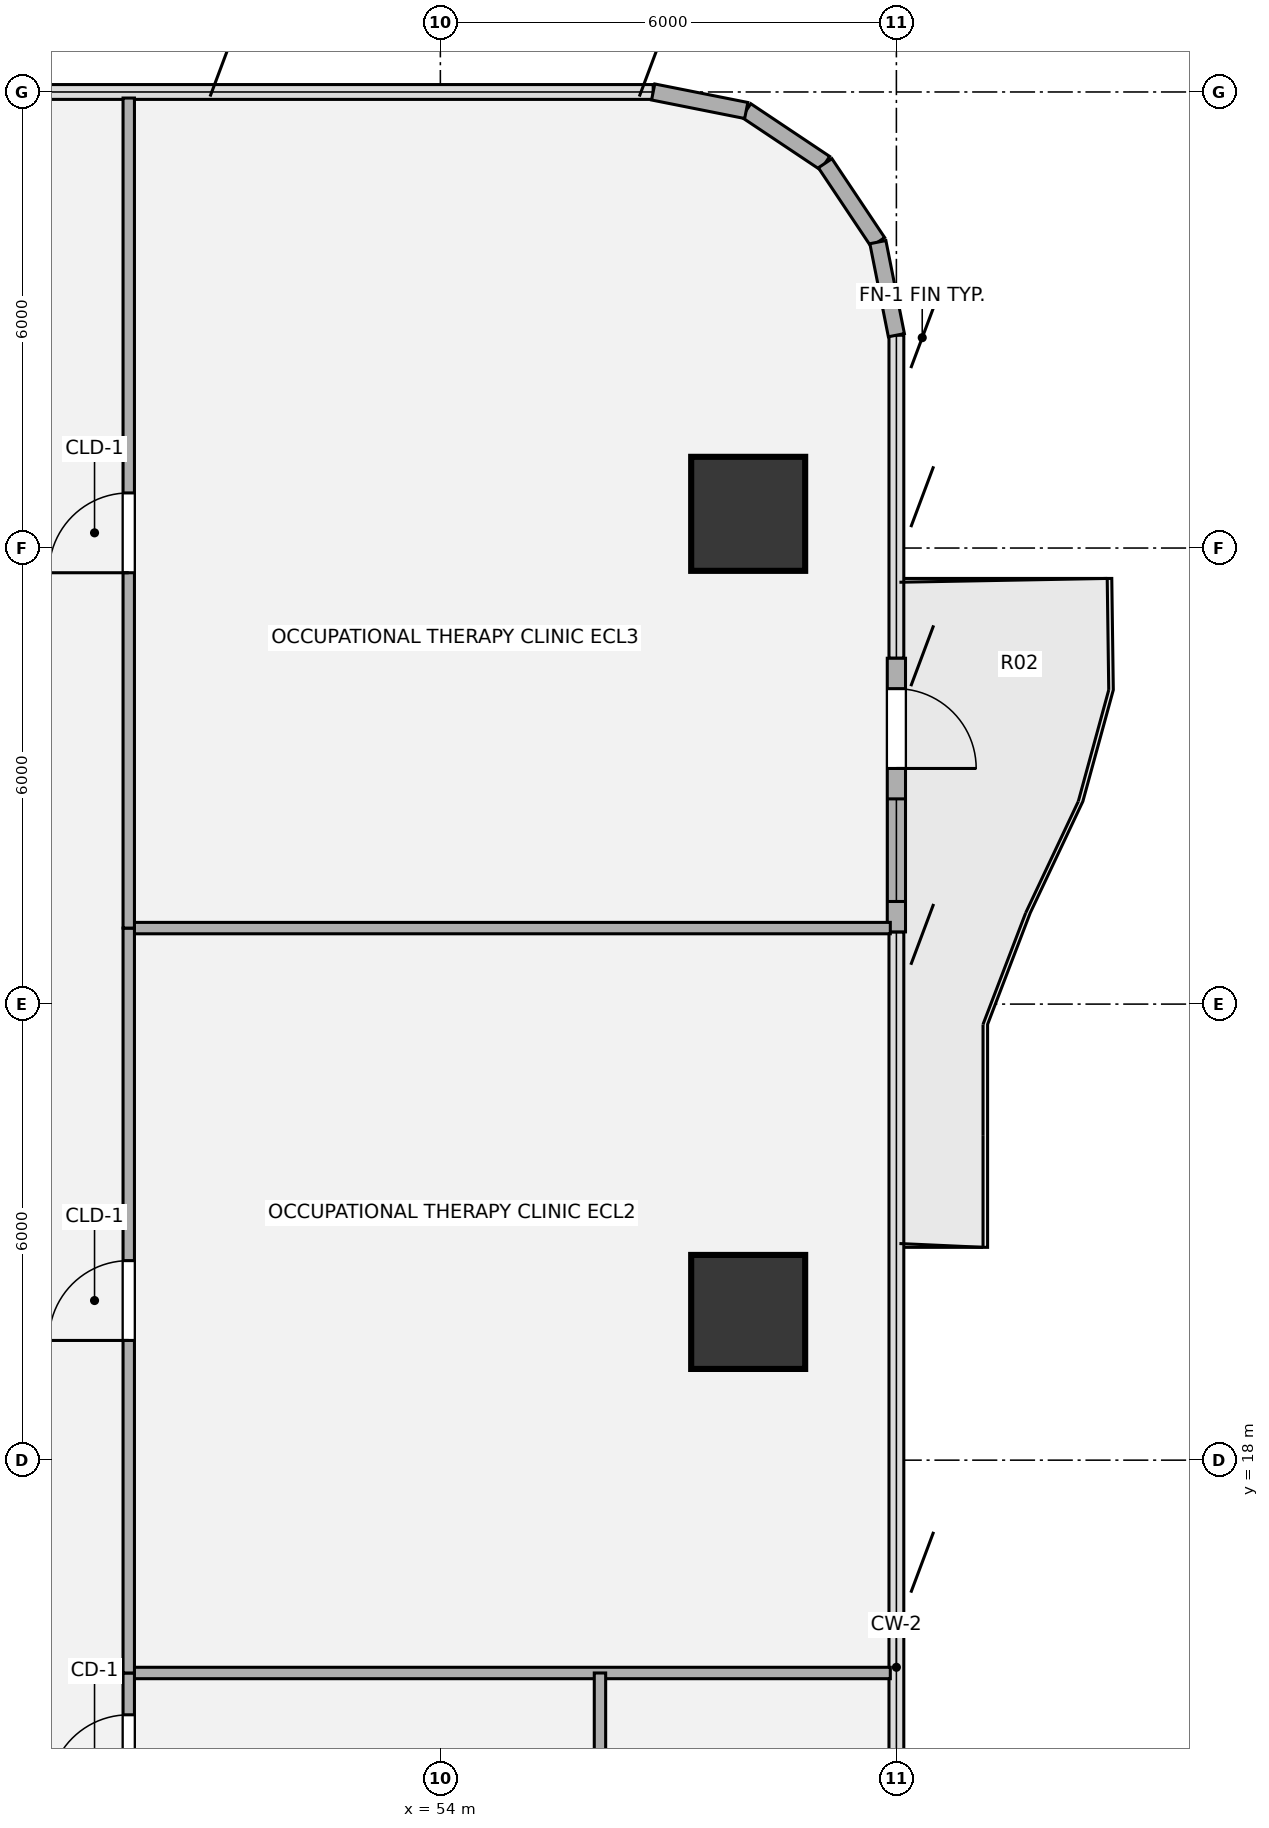
"""IFC4 building model, lengths in metres.
Left out: names, types, materials, properties, quantities, classifications, styles, units other than length and angle.
Written with IfcOpenShell. Run it as: python <this file> out.ifc"""

import sys

from ifc_helpers import new_model, si_unit, direction, frame, frame_2d, origin, origin_2d, place, context, subcontext, project, spatial, rectangle, hollow_circle, extrude, source, transform, mapped, element, fill, save


model = new_model("IFC4")
c1 = context("Model", 3, precision=1e-05, world=origin(), true_north=direction((0.0, 1.0)))
c2 = subcontext(c1, "Body", "Model", "MODEL_VIEW")
j1 = project(units=[si_unit("LENGTHUNIT", "METRE"), si_unit("PLANEANGLEUNIT", "RADIAN")], contexts=[c1])
p1 = place(None, origin())
s1 = spatial("IfcSite", under=j1, at=p1, CompositionType="ELEMENT")
p2 = place(p1, origin())
s2 = spatial("IfcBuilding", under=s1, at=p2, CompositionType="ELEMENT")
p3 = place(p2, frame((0.0, 0.0, 49.68)))
s3 = spatial("IfcBuildingStorey", under=s2, at=p3, CompositionType="ELEMENT", Elevation=49.68)
m1 = source(origin(), c2, "Body", "SweptSolid", [
    extrude(hollow_circle(Radius=0.75, WallThickness=0.05, at=origin_2d()), origin(), (0.0, 0.0, 1.0), 3.78),
])
for number, where, z_axis, x_axis in (
    (1, (58.05, 19.95, 0.0), (0.0, 0.0, 1.0), (1.0, 0.0, 0.0)),
    (2, (58.05, 30.45, 0.0), (0.0, 0.0, 1.0), (1.0, 0.0, 0.0)),
):
    element("IfcColumn", number, at=place(p3, frame(where, z_axis=z_axis, x_axis=x_axis)), inside=s3, PredefinedType="COLUMN", context=c2, shape_type="MappedRepresentation", body=[
        mapped(m1, transform((0.0, 0.0, 0.0), x_axis=(1.0, 0.0, 0.0), y_axis=(0.0, 1.0, 0.0), z_axis=(0.0, 0.0, 1.0), scale=1.0)),
    ])
for number, where, z_axis, x_axis in (
    (3, (58.025, 35.756, 0.0), (0.0, 0.0, 1.0), (0.831, -0.556, 0.0)),
    (4, (59.063, 35.063, 0.0), (0.0, 0.0, 1.0), (0.556, -0.831, 0.0)),
    (5, (59.756, 34.025, 0.0), (0.0, 0.0, 1.0), (0.195, -0.981, 0.0)),
):
    element("IfcWall", number, at=place(p3, frame(where, z_axis=z_axis, x_axis=x_axis)), inside=s3, PredefinedType="SOLIDWALL", context=c2, shape_type="SweptSolid", body=[
        extrude(rectangle(XDim=1.249, YDim=0.215, at=frame_2d((0.624, 0.0))), origin(), (0.0, 0.0, 1.0), 3.53),
    ])
p4 = place(p3, frame((60.0, 28.55, 0.0), z_axis=(0.0, 0.0, 1.0), x_axis=(0.0, -1.0, 0.0)))
e6 = element("IfcWall", 6, at=p4, inside=s3, PredefinedType="SOLIDWALL", context=c2, shape_type="SweptSolid", body=[
    extrude(rectangle(XDim=3.6, YDim=0.24, at=frame_2d((1.8, 0.0))), origin(), (0.0, 0.0, 1.0), 3.53),
])
p5 = place(p4, frame((0.4, 0.0, 0.0)))
e7 = element("IfcOpeningElement", 7, at=p5, cuts=e6, PredefinedType="OPENING", context=c2, shape_type="SweptSolid", body=[
    extrude(rectangle(XDim=1.05, YDim=2.15, at=origin_2d()), frame((0.525, 0.13, 1.075), z_axis=(0.0, -1.0, 0.0), x_axis=(1.0, 0.0, 0.0)), (0.0, 0.0, 1.0), 0.26),
])
p6 = place(p4, frame((1.85, 0.0, 0.85)))
e8 = element("IfcOpeningElement", 8, at=p6, cuts=e6, PredefinedType="OPENING", context=c2, shape_type="SweptSolid", body=[
    extrude(rectangle(XDim=1.35, YDim=1.35, at=origin_2d()), frame((0.675, 0.13, 0.675), z_axis=(0.0, -1.0, 0.0), x_axis=(1.0, 0.0, 0.0)), (0.0, 0.0, 1.0), 0.26),
])
p7 = place(p3, frame((56.8, 36.0, 0.0), z_axis=(0.0, 0.0, 1.0), x_axis=(0.980775717779, -0.195138390419, 0.0)))
e9 = element("IfcWall", 9, at=p7, inside=s3, PredefinedType="SOLIDWALL", context=c2, shape_type="SweptSolid", body=[
    extrude(rectangle(XDim=1.249, YDim=0.215, at=frame_2d((0.624, 0.0))), origin(), (0.0, 0.0, 1.0), 3.53),
])
p8 = place(p3, frame((49.9, 15.2, 0.0), z_axis=(0.0, 0.0, 1.0), x_axis=(1.0, 0.0, 0.0)))
e10 = element("IfcWall", 10, at=p8, inside=s3, PredefinedType="PARTITIONING", context=c2, shape_type="SweptSolid", body=[
    extrude(rectangle(XDim=10.02, YDim=0.15, at=frame_2d((5.01, 0.0))), origin(), (0.0, 0.0, 1.0), 3.5),
])
p9 = place(p3, frame((49.9, 25.0, 0.0), z_axis=(0.0, 0.0, 1.0), x_axis=(1.0, 0.0, 0.0)))
e11 = element("IfcWall", 11, at=p9, inside=s3, PredefinedType="PARTITIONING", context=c2, shape_type="SweptSolid", body=[
    extrude(rectangle(XDim=10.02, YDim=0.15, at=frame_2d((5.01, 0.0))), origin(), (0.0, 0.0, 1.0), 2.982),
])
p10 = place(p3, frame((49.9, 13.04, 0.0), z_axis=(0.0, 0.0, 1.0), x_axis=(0.0, 1.0, 0.0)))
e12 = element("IfcWall", 12, at=p10, inside=s3, PredefinedType="PARTITIONING", context=c2, shape_type="SweptSolid", body=[
    extrude(rectangle(XDim=2.16, YDim=0.15, at=frame_2d((1.08, 0.0))), origin(), (0.0, 0.0, 1.0), 3.5),
])
p11 = place(p10, frame((0.56, 0.0, 0.0)))
e13 = element("IfcOpeningElement", 13, at=p11, cuts=e12, PredefinedType="OPENING", context=c2, shape_type="SweptSolid", body=[
    extrude(rectangle(XDim=1.05, YDim=2.1, at=origin_2d()), frame((0.525, 0.085, 1.05), z_axis=(0.0, -1.0, 0.0), x_axis=(1.0, 0.0, 0.0)), (0.0, 0.0, 1.0), 0.17),
])
p12 = place(p3, frame((49.9, 15.2, 0.0), z_axis=(0.0, 0.0, 1.0), x_axis=(0.0, 1.0, 0.0)))
e14 = element("IfcWall", 14, at=p12, inside=s3, PredefinedType="PARTITIONING", context=c2, shape_type="SweptSolid", body=[
    extrude(rectangle(XDim=9.8, YDim=0.15, at=frame_2d((4.9, 0.0))), origin(), (0.0, 0.0, 1.0), 3.5),
])
p13 = place(p12, frame((4.375, 0.0, 0.0)))
e15 = element("IfcOpeningElement", 15, at=p13, cuts=e14, PredefinedType="OPENING", context=c2, shape_type="SweptSolid", body=[
    extrude(rectangle(XDim=1.05, YDim=2.1, at=origin_2d()), frame((0.525, 0.085, 1.05), z_axis=(0.0, -1.0, 0.0), x_axis=(1.0, 0.0, 0.0)), (0.0, 0.0, 1.0), 0.17),
])
p14 = place(p3, frame((49.9, 25.0, 0.0), z_axis=(0.0, 0.0, 1.0), x_axis=(0.0, 1.0, 0.0)))
e16 = element("IfcWall", 16, at=p14, inside=s3, PredefinedType="PARTITIONING", context=c2, shape_type="SweptSolid", body=[
    extrude(rectangle(XDim=10.92, YDim=0.15, at=frame_2d((5.46, 0.0))), origin(), (0.0, 0.0, 1.0), 3.5),
])
p15 = place(p14, frame((4.675, 0.0, 0.0)))
e17 = element("IfcOpeningElement", 17, at=p15, cuts=e16, PredefinedType="OPENING", context=c2, shape_type="SweptSolid", body=[
    extrude(rectangle(XDim=1.05, YDim=2.1, at=origin_2d()), frame((0.525, 0.085, 1.05), z_axis=(0.0, -1.0, 0.0), x_axis=(1.0, 0.0, 0.0)), (0.0, 0.0, 1.0), 0.17),
])
p16 = place(p3, frame((56.1, 10.64, 0.0), z_axis=(0.0, 0.0, 1.0), x_axis=(0.0, 1.0, 0.0)))
e18 = element("IfcWall", 18, at=p16, inside=s3, PredefinedType="PARTITIONING", context=c2, shape_type="SweptSolid", body=[
    extrude(rectangle(XDim=4.56, YDim=0.15, at=frame_2d((2.28, 0.0))), origin(), (0.0, 0.0, 1.0), 3.5),
])
p17 = place(p16, frame((1.9, 0.0, 0.0)))
e19 = element("IfcOpeningElement", 19, at=p17, cuts=e18, PredefinedType="OPENING", context=c2, shape_type="SweptSolid", body=[
    extrude(rectangle(XDim=0.86, YDim=2.1, at=origin_2d()), frame((0.43, 0.085, 1.05), z_axis=(0.0, -1.0, 0.0), x_axis=(1.0, 0.0, 0.0)), (0.0, 0.0, 1.0), 0.17),
])
m2 = source(origin(), c2, "Body", "SweptSolid", [
    extrude(rectangle(XDim=1.05, YDim=2.15, at=origin_2d()), frame((0.525, 0.025, 1.075), z_axis=(0.0, -1.0, 0.0), x_axis=(1.0, 0.0, 0.0)), (0.0, 0.0, 1.0), 0.05),
])
p18 = place(p5, origin())
e20 = element("IfcDoor", 20, at=p18, inside=s3, OperationType="SINGLE_SWING_RIGHT", PredefinedType="DOOR", context=c2, shape_type="MappedRepresentation", body=[
    mapped(m2, transform((0.0, 0.0, 0.0), x_axis=(1.0, 0.0, 0.0), y_axis=(0.0, 1.0, 0.0), z_axis=(0.0, 0.0, 1.0), scale=1.0)),
])
fill(e7, e20)
m3 = source(origin(), c2, "Body", "SweptSolid", [
    extrude(rectangle(XDim=1.35, YDim=1.35, at=origin_2d()), frame((0.675, 0.03, 0.675), z_axis=(0.0, -1.0, 0.0), x_axis=(1.0, 0.0, 0.0)), (0.0, 0.0, 1.0), 0.06),
])
p19 = place(p6, origin())
e21 = element("IfcWindow", 21, at=p19, inside=s3, PartitioningType="SINGLE_PANEL", PredefinedType="WINDOW", context=c2, shape_type="MappedRepresentation", body=[
    mapped(m3, transform((0.0, 0.0, 0.0), x_axis=(1.0, 0.0, 0.0), y_axis=(0.0, 1.0, 0.0), z_axis=(0.0, 0.0, 1.0), scale=1.0)),
])
fill(e8, e21)
m4 = source(origin(), c2, "Body", "SweptSolid", [
    extrude(rectangle(XDim=1.05, YDim=2.1, at=origin_2d()), frame((0.525, 0.025, 1.05), z_axis=(0.0, -1.0, 0.0), x_axis=(1.0, 0.0, 0.0)), (0.0, 0.0, 1.0), 0.05),
])
p20 = place(p11, origin())
e22 = element("IfcDoor", 22, at=p20, inside=s3, OperationType="SINGLE_SWING_LEFT", PredefinedType="DOOR", context=c2, shape_type="MappedRepresentation", body=[
    mapped(m4, transform((0.0, 0.0, 0.0), x_axis=(1.0, 0.0, 0.0), y_axis=(0.0, 1.0, 0.0), z_axis=(0.0, 0.0, 1.0), scale=1.0)),
])
fill(e13, e22)
m5 = source(origin(), c2, "Body", "SweptSolid", [
    extrude(rectangle(XDim=1.05, YDim=2.1, at=origin_2d()), frame((0.525, 0.025, 1.05), z_axis=(0.0, -1.0, 0.0), x_axis=(1.0, 0.0, 0.0)), (0.0, 0.0, 1.0), 0.05),
])
p21 = place(p13, origin())
e23 = element("IfcDoor", 23, at=p21, inside=s3, OperationType="SINGLE_SWING_LEFT", PredefinedType="DOOR", context=c2, shape_type="MappedRepresentation", body=[
    mapped(m5, transform((0.0, 0.0, 0.0), x_axis=(1.0, 0.0, 0.0), y_axis=(0.0, 1.0, 0.0), z_axis=(0.0, 0.0, 1.0), scale=1.0)),
])
fill(e15, e23)
p22 = place(p15, origin())
e24 = element("IfcDoor", 24, at=p22, inside=s3, OperationType="SINGLE_SWING_LEFT", PredefinedType="DOOR", context=c2, shape_type="MappedRepresentation", body=[
    mapped(m5, transform((0.0, 0.0, 0.0), x_axis=(1.0, 0.0, 0.0), y_axis=(0.0, 1.0, 0.0), z_axis=(0.0, 0.0, 1.0), scale=1.0)),
])
fill(e17, e24)
save(model, sys.argv[1])
